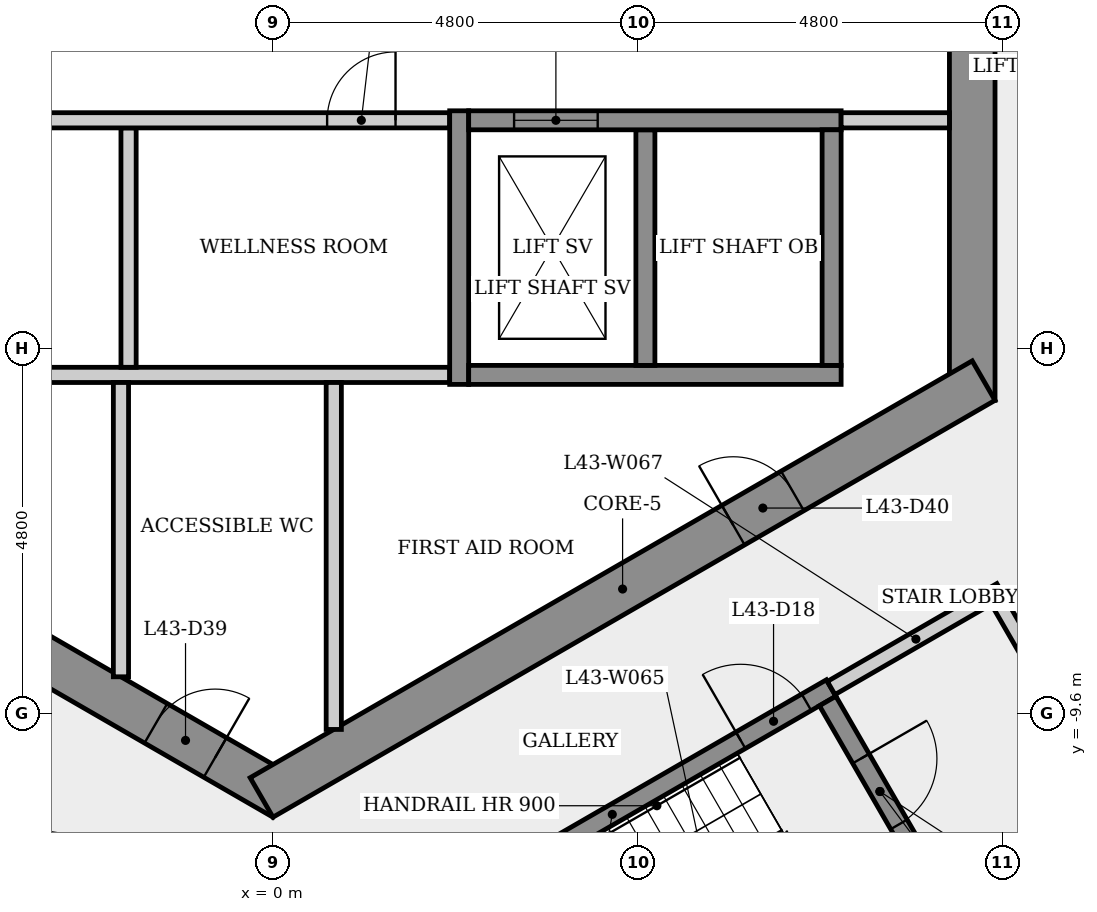
"""IFC4 building model, lengths in metres.
Left out: names, types, materials, properties, quantities, classifications, styles, units other than length and angle.
Written with IfcOpenShell. Run it as: python <this file> out.ifc"""

import sys

from ifc_helpers import new_model, si_unit, direction, frame, frame_2d, origin, place, context, subcontext, project, spatial, rectangle, extrude, element, fill, save


model = new_model("IFC4")
c1 = context("Model", 3, precision=1e-05, world=origin(), true_north=direction((0.0, 1.0)))
c2 = subcontext(c1, "Body", "Model", "MODEL_VIEW")
j1 = project(units=[si_unit("LENGTHUNIT", "METRE"), si_unit("PLANEANGLEUNIT", "RADIAN")], contexts=[c1])
p1 = place(None, origin())
s1 = spatial("IfcSite", under=j1, at=p1, CompositionType="ELEMENT")
p2 = place(p1, origin())
s2 = spatial("IfcBuilding", under=s1, at=p2, CompositionType="ELEMENT")
p3 = place(p2, frame((0.0, 0.0, 162.9)))
s3 = spatial("IfcBuildingStorey", under=s2, at=p3, CompositionType="ELEMENT", Elevation=162.9)
p4 = place(p3, frame((9.2, -5.485, 0.0), z_axis=(0.0, 0.0, 1.0), x_axis=(0.0, 1.0, 0.0)))
e1 = element("IfcWall", 1, at=p4, inside=s3, PredefinedType="SHEAR", context=c2, shape_type="SweptSolid", body=[
    extrude(rectangle(XDim=10.97, YDim=0.6, at=frame_2d((5.485, 0.0))), origin(), (0.0, 0.0, 1.0), 3.4),
])
p5 = place(p4, frame((4.685, 0.0, 0.0)))
e2 = element("IfcOpeningElement", 2, at=p5, cuts=e1, PredefinedType="OPENING", context=c2, shape_type="SweptSolid", body=[
    extrude(rectangle(XDim=1.6, YDim=2.1, at=frame_2d((0.8, 1.05))), frame((0.0, 0.31, 0.0), z_axis=(0.0, -1.0, 0.0), x_axis=(1.0, 0.0, 0.0)), (0.0, 0.0, 1.0), 0.62),
])
p6 = place(p3, frame((-9.35, -5.225, 0.0), z_axis=(0.0, 0.0, 1.0), x_axis=(0.866023993627, -0.500002442456, 0.0)))
e3 = element("IfcWall", 3, at=p6, inside=s3, PredefinedType="SHEAR", context=c2, shape_type="SweptSolid", body=[
    extrude(rectangle(XDim=10.97, YDim=0.6, at=frame_2d((5.485, 0.0))), origin(), (0.0, 0.0, 1.0), 3.4),
])
p7 = place(p6, frame((3.891, 0.0, 0.0)))
e4 = element("IfcOpeningElement", 4, at=p7, cuts=e3, PredefinedType="OPENING", context=c2, shape_type="SweptSolid", body=[
    extrude(rectangle(XDim=0.9, YDim=2.1, at=frame_2d((0.45, 1.05))), frame((0.0, 0.31, 0.0), z_axis=(0.0, -1.0, 0.0), x_axis=(1.0, 0.0, 0.0)), (0.0, 0.0, 1.0), 0.62),
])
p8 = place(p6, frame((9.018, 0.0, 0.0)))
e5 = element("IfcOpeningElement", 5, at=p8, cuts=e3, PredefinedType="OPENING", context=c2, shape_type="SweptSolid", body=[
    extrude(rectangle(XDim=0.9, YDim=2.1, at=frame_2d((0.45, 1.05))), frame((0.0, 0.31, 0.0), z_axis=(0.0, -1.0, 0.0), x_axis=(1.0, 0.0, 0.0)), (0.0, 0.0, 1.0), 0.62),
])
p9 = place(p3, frame((-0.15, -10.71, 0.0), z_axis=(0.0, 0.0, 1.0), x_axis=(0.866023993627, 0.500002442456, 0.0)))
e6 = element("IfcWall", 6, at=p9, inside=s3, PredefinedType="SHEAR", context=c2, shape_type="SweptSolid", body=[
    extrude(rectangle(XDim=10.97, YDim=0.6, at=frame_2d((5.485, 0.0))), origin(), (0.0, 0.0, 1.0), 3.4),
])
p10 = place(p9, frame((7.166, 0.0, 0.0)))
e7 = element("IfcOpeningElement", 7, at=p10, cuts=e6, PredefinedType="OPENING", context=c2, shape_type="SweptSolid", body=[
    extrude(rectangle(XDim=0.9, YDim=2.1, at=frame_2d((0.45, 1.05))), frame((0.0, 0.31, 0.0), z_axis=(0.0, -1.0, 0.0), x_axis=(1.0, 0.0, 0.0)), (0.0, 0.0, 1.0), 0.62),
])
p11 = place(p3, frame((-8.88, -5.15, 0.0), z_axis=(0.0, 0.0, 1.0), x_axis=(1.0, 0.0, 0.0)))
e8 = element("IfcWall", 8, at=p11, inside=s3, PredefinedType="PARTITIONING", context=c2, shape_type="SweptSolid", body=[
    extrude(rectangle(XDim=11.205, YDim=0.2, at=frame_2d((5.603, 0.0))), origin(), (0.0, 0.0, 1.0), 3.05),
])
p12 = place(p3, frame((-6.435, -9.795, 0.0), z_axis=(0.0, 0.0, 1.0), x_axis=(0.866012907634, -0.500021643343, 0.0)))
e9 = element("IfcWall", 9, at=p12, inside=s3, PredefinedType="PARTITIONING", context=c2, shape_type="SweptSolid", body=[
    extrude(rectangle(XDim=4.45, YDim=0.2, at=frame_2d((2.225, 0.0))), origin(), (0.0, 0.0, 1.0), 3.05),
])
p13 = place(p12, frame((1.675, 0.0, 0.0)))
e10 = element("IfcOpeningElement", 10, at=p13, cuts=e9, PredefinedType="OPENING", context=c2, shape_type="SweptSolid", body=[
    extrude(rectangle(XDim=1.1, YDim=2.1, at=frame_2d((0.55, 1.05))), frame((0.0, 0.11, 0.0), z_axis=(0.0, -1.0, 0.0), x_axis=(1.0, 0.0, 0.0)), (0.0, 0.0, 1.0), 0.22),
])
p14 = place(p3, frame((-2.0, -5.25, 0.0), z_axis=(0.0, 0.0, 1.0), x_axis=(0.0, -1.0, 0.0)))
e11 = element("IfcWall", 11, at=p14, inside=s3, PredefinedType="PARTITIONING", context=c2, shape_type="SweptSolid", body=[
    extrude(rectangle(XDim=3.872, YDim=0.2, at=frame_2d((1.936, 0.0))), origin(), (0.0, 0.0, 1.0), 3.05),
])
p15 = place(p3, frame((-1.9, -1.9, 0.0), z_axis=(0.0, 0.0, 1.0), x_axis=(0.0, -1.0, 0.0)))
e12 = element("IfcWall", 12, at=p15, inside=s3, PredefinedType="PARTITIONING", context=c2, shape_type="SweptSolid", body=[
    extrude(rectangle(XDim=3.15, YDim=0.2, at=frame_2d((1.575, 0.0))), origin(), (0.0, 0.0, 1.0), 3.05),
])
p16 = place(p3, frame((-8.9, -1.8, 0.0), z_axis=(0.0, 0.0, 1.0), x_axis=(1.0, 0.0, 0.0)))
e13 = element("IfcWall", 13, at=p16, inside=s3, PredefinedType="PARTITIONING", context=c2, shape_type="SweptSolid", body=[
    extrude(rectangle(XDim=11.225, YDim=0.2, at=frame_2d((5.613, 0.0))), origin(), (0.0, 0.0, 1.0), 3.05),
])
p17 = place(p16, frame((3.035, 0.0, 0.0)))
e14 = element("IfcOpeningElement", 14, at=p17, cuts=e13, PredefinedType="OPENING", context=c2, shape_type="SweptSolid", body=[
    extrude(rectangle(XDim=0.9, YDim=2.1, at=frame_2d((0.45, 1.05))), frame((0.0, 0.11, 0.0), z_axis=(0.0, -1.0, 0.0), x_axis=(1.0, 0.0, 0.0)), (0.0, 0.0, 1.0), 0.22),
])
p18 = place(p16, frame((9.613, 0.0, 0.0)))
e15 = element("IfcOpeningElement", 15, at=p18, cuts=e13, PredefinedType="OPENING", context=c2, shape_type="SweptSolid", body=[
    extrude(rectangle(XDim=0.9, YDim=2.1, at=frame_2d((0.45, 1.05))), frame((0.0, 0.11, 0.0), z_axis=(0.0, -1.0, 0.0), x_axis=(1.0, 0.0, 0.0)), (0.0, 0.0, 1.0), 0.22),
])
p19 = place(p3, frame((0.8, -5.25, 0.0), z_axis=(0.0, 0.0, 1.0), x_axis=(0.0, -1.0, 0.0)))
e16 = element("IfcWall", 16, at=p19, inside=s3, PredefinedType="PARTITIONING", context=c2, shape_type="SweptSolid", body=[
    extrude(rectangle(XDim=4.565, YDim=0.2, at=frame_2d((2.282, 0.0))), origin(), (0.0, 0.0, 1.0), 3.05),
])
p20 = place(p3, frame((1.585, -12.595, 0.0), z_axis=(0.0, 0.0, 1.0), x_axis=(0.866036417653, 0.499980922934, 0.0)))
e17 = element("IfcWall", 17, at=p20, inside=s3, PredefinedType="SHEAR", context=c2, shape_type="SweptSolid", body=[
    extrude(rectangle(XDim=6.65, YDim=0.25, at=frame_2d((3.325, 0.0))), origin(), (0.0, 0.0, 1.0), 3.05),
])
p21 = place(p20, frame((5.275, 0.0, 0.0)))
e18 = element("IfcOpeningElement", 18, at=p21, cuts=e17, PredefinedType="OPENING", context=c2, shape_type="SweptSolid", body=[
    extrude(rectangle(XDim=1.0, YDim=2.1, at=frame_2d((0.5, 1.05))), frame((0.0, 0.135, 0.0), z_axis=(0.0, -1.0, 0.0), x_axis=(1.0, 0.0, 0.0)), (0.0, 0.0, 1.0), 0.27),
])
p22 = place(p3, frame((2.45, -5.275, 0.0), z_axis=(0.0, 0.0, 1.0), x_axis=(0.0, 1.0, 0.0)))
e19 = element("IfcWall", 19, at=p22, inside=s3, PredefinedType="SHEAR", context=c2, shape_type="SweptSolid", body=[
    extrude(rectangle(XDim=3.6, YDim=0.25, at=frame_2d((1.8, 0.0))), origin(), (0.0, 0.0, 1.0), 3.05),
])
p23 = place(p3, frame((2.575, -5.15, 0.0), z_axis=(0.0, 0.0, 1.0), x_axis=(1.0, 0.0, 0.0)))
e20 = element("IfcWall", 20, at=p23, inside=s3, PredefinedType="SHEAR", context=c2, shape_type="SweptSolid", body=[
    extrude(rectangle(XDim=4.9, YDim=0.25, at=frame_2d((2.45, 0.0))), origin(), (0.0, 0.0, 1.0), 3.05),
])
p24 = place(p3, frame((4.9, -1.925, 0.0), z_axis=(0.0, 0.0, 1.0), x_axis=(0.0, -1.0, 0.0)))
e21 = element("IfcWall", 21, at=p24, inside=s3, PredefinedType="SHEAR", context=c2, shape_type="SweptSolid", body=[
    extrude(rectangle(XDim=3.1, YDim=0.25, at=frame_2d((1.55, 0.0))), origin(), (0.0, 0.0, 1.0), 3.4),
])
p25 = place(p3, frame((2.575, -1.8, 0.0), z_axis=(0.0, 0.0, 1.0), x_axis=(1.0, 0.0, 0.0)))
e22 = element("IfcWall", 22, at=p25, inside=s3, PredefinedType="SHEAR", context=c2, shape_type="SweptSolid", body=[
    extrude(rectangle(XDim=4.9, YDim=0.25, at=frame_2d((2.45, 0.0))), origin(), (0.0, 0.0, 1.0), 3.05),
])
p26 = place(p25, frame((0.597, 0.0, 0.0)))
e23 = element("IfcOpeningElement", 23, at=p26, cuts=e22, PredefinedType="OPENING", context=c2, shape_type="SweptSolid", body=[
    extrude(rectangle(XDim=1.1, YDim=2.1, at=frame_2d((0.55, 1.05))), frame((0.0, 0.135, 0.0), z_axis=(0.0, -1.0, 0.0), x_axis=(1.0, 0.0, 0.0)), (0.0, 0.0, 1.0), 0.27),
])
p27 = place(p3, frame((7.298, -9.441, 0.0), z_axis=(0.0, 0.0, 1.0), x_axis=(0.500034990121, -0.866005201286, 0.0)))
e24 = element("IfcWall", 24, at=p27, inside=s3, PredefinedType="SHEAR", context=c2, shape_type="SweptSolid", body=[
    extrude(rectangle(XDim=2.75, YDim=0.25, at=frame_2d((1.375, 0.0))), origin(), (0.0, 0.0, 1.0), 3.05),
])
p28 = place(p27, frame((0.875, 0.0, 0.0)))
e25 = element("IfcOpeningElement", 25, at=p28, cuts=e24, PredefinedType="OPENING", context=c2, shape_type="SweptSolid", body=[
    extrude(rectangle(XDim=1.0, YDim=2.1, at=frame_2d((0.5, 1.05))), frame((0.0, 0.135, 0.0), z_axis=(0.0, -1.0, 0.0), x_axis=(1.0, 0.0, 0.0)), (0.0, 0.0, 1.0), 0.27),
])
p29 = place(p3, frame((7.344, -9.27, 0.0), z_axis=(0.0, 0.0, 1.0), x_axis=(0.866005588531, 0.500034319456, 0.0)))
e26 = element("IfcWall", 26, at=p29, inside=s3, PredefinedType="PARTITIONING", context=c2, shape_type="SweptSolid", body=[
    extrude(rectangle(XDim=2.575, YDim=0.2, at=frame_2d((1.288, 0.0))), origin(), (0.0, 0.0, 1.0), 3.05),
])
p30 = place(p3, frame((7.35, -1.925, 0.0), z_axis=(0.0, 0.0, 1.0), x_axis=(0.0, -1.0, 0.0)))
e27 = element("IfcWall", 27, at=p30, inside=s3, PredefinedType="SHEAR", context=c2, shape_type="SweptSolid", body=[
    extrude(rectangle(XDim=3.1, YDim=0.25, at=frame_2d((1.55, 0.0))), origin(), (0.0, 0.0, 1.0), 3.4),
])
p31 = place(p3, frame((8.9, -1.8, 0.0), z_axis=(0.0, 0.0, 1.0), x_axis=(-1.0, 0.0, 0.0)))
e28 = element("IfcWall", 28, at=p31, inside=s3, PredefinedType="PARTITIONING", context=c2, shape_type="SweptSolid", body=[
    extrude(rectangle(XDim=1.425, YDim=0.2, at=frame_2d((0.712, 0.0))), origin(), (0.0, 0.0, 1.0), 3.05),
])
p32 = place(p3, frame((9.537, -8.119, 0.0), z_axis=(0.0, 0.0, 1.0), x_axis=(0.499990139034, -0.866031096941, 0.0)))
e29 = element("IfcWall", 29, at=p32, inside=s3, PredefinedType="PARTITIONING", context=c2, shape_type="SweptSolid", body=[
    extrude(rectangle(XDim=3.0, YDim=0.2, at=frame_2d((1.5, 0.0))), origin(), (0.0, 0.0, 1.0), 3.05),
])
p33 = place(p32, frame((0.935, 0.0, 0.0)))
e30 = element("IfcOpeningElement", 30, at=p33, cuts=e29, PredefinedType="OPENING", context=c2, shape_type="SweptSolid", body=[
    extrude(rectangle(XDim=1.0, YDim=2.1, at=frame_2d((0.5, 1.05))), frame((0.0, 0.11, 0.0), z_axis=(0.0, -1.0, 0.0), x_axis=(1.0, 0.0, 0.0)), (0.0, 0.0, 1.0), 0.22),
])
p34 = place(p3, frame((10.901, -10.681, 0.0), z_axis=(0.0, 0.0, 1.0), x_axis=(-0.866007538022, -0.500030943131, 0.0)))
e31 = element("IfcWall", 31, at=p34, inside=s3, PredefinedType="PARTITIONING", context=c2, shape_type="SweptSolid", body=[
    extrude(rectangle(XDim=2.375, YDim=0.2, at=frame_2d((1.188, 0.0))), origin(), (0.0, 0.0, 1.0), 3.05),
])
p35 = place(p26, origin())
e32 = element("IfcDoor", 32, at=p35, inside=s3, OperationType="SLIDING_TO_LEFT", PredefinedType="DOOR", context=c2, shape_type="SweptSolid", body=[
    extrude(rectangle(XDim=1.1, YDim=2.1, at=frame_2d((0.55, 1.05))), frame((0.0, 0.025, 0.0), z_axis=(0.0, -1.0, 0.0), x_axis=(1.0, 0.0, 0.0)), (0.0, 0.0, 1.0), 0.05),
])
fill(e23, e32)
p36 = place(p18, origin())
e33 = element("IfcDoor", 33, at=p36, inside=s3, OperationType="SINGLE_SWING_RIGHT", PredefinedType="DOOR", context=c2, shape_type="SweptSolid", body=[
    extrude(rectangle(XDim=0.9, YDim=2.1, at=frame_2d((0.45, 1.05))), frame((0.0, 0.025, 0.0), z_axis=(0.0, -1.0, 0.0), x_axis=(1.0, 0.0, 0.0)), (0.0, 0.0, 1.0), 0.05),
])
fill(e15, e33)
p37 = place(p21, origin())
e34 = element("IfcDoor", 34, at=p37, inside=s3, OperationType="SINGLE_SWING_LEFT", PredefinedType="DOOR", context=c2, shape_type="SweptSolid", body=[
    extrude(rectangle(XDim=1.0, YDim=2.1, at=frame_2d((0.5, 1.05))), frame((0.0, 0.025, 0.0), z_axis=(0.0, -1.0, 0.0), x_axis=(1.0, 0.0, 0.0)), (0.0, 0.0, 1.0), 0.05),
])
fill(e18, e34)
p38 = place(p28, origin())
e35 = element("IfcDoor", 35, at=p38, inside=s3, OperationType="SINGLE_SWING_LEFT", PredefinedType="DOOR", context=c2, shape_type="SweptSolid", body=[
    extrude(rectangle(XDim=1.0, YDim=2.1, at=frame_2d((0.5, 1.05))), frame((0.0, 0.025, 0.0), z_axis=(0.0, -1.0, 0.0), x_axis=(1.0, 0.0, 0.0)), (0.0, 0.0, 1.0), 0.05),
])
fill(e25, e35)
p39 = place(p8, origin())
e36 = element("IfcDoor", 36, at=p39, inside=s3, OperationType="SINGLE_SWING_RIGHT", PredefinedType="DOOR", context=c2, shape_type="SweptSolid", body=[
    extrude(rectangle(XDim=0.9, YDim=2.1, at=frame_2d((0.45, 1.05))), frame((0.0, 0.025, 0.0), z_axis=(0.0, -1.0, 0.0), x_axis=(1.0, 0.0, 0.0)), (0.0, 0.0, 1.0), 0.05),
])
fill(e5, e36)
p40 = place(p10, origin())
e37 = element("IfcDoor", 37, at=p40, inside=s3, OperationType="SINGLE_SWING_LEFT", PredefinedType="DOOR", context=c2, shape_type="SweptSolid", body=[
    extrude(rectangle(XDim=0.9, YDim=2.1, at=frame_2d((0.45, 1.05))), frame((0.0, 0.025, 0.0), z_axis=(0.0, -1.0, 0.0), x_axis=(1.0, 0.0, 0.0)), (0.0, 0.0, 1.0), 0.05),
])
fill(e7, e37)
save(model, sys.argv[1])
